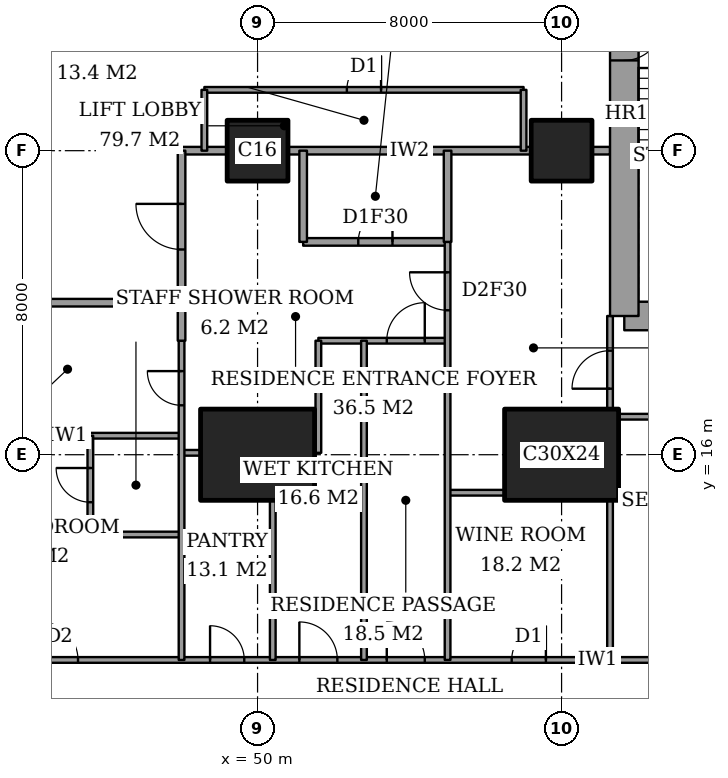
"""IFC4 building model, lengths in metres.
Left out: names, types, materials, properties, quantities, classifications, styles, units other than length and angle.
Written with IfcOpenShell. Run it as: python <this file> out.ifc"""

import sys

from ifc_helpers import new_model, si_unit, direction, frame, frame_2d, origin, origin_2d, place, context, subcontext, project, spatial, rectangle, extrude, element, fill, save


model = new_model("IFC4")
c1 = context("Model", 3, precision=1e-05, world=origin(), true_north=direction((0.0, 1.0)))
c2 = subcontext(c1, "Body", "Model", "MODEL_VIEW")
j1 = project(units=[si_unit("LENGTHUNIT", "METRE"), si_unit("PLANEANGLEUNIT", "RADIAN")], contexts=[c1])
p1 = place(None, origin())
s1 = spatial("IfcSite", under=j1, at=p1, CompositionType="ELEMENT")
p2 = place(p1, origin())
s2 = spatial("IfcBuilding", under=s1, at=p2, CompositionType="ELEMENT")
p3 = place(p2, frame((0.0, 0.0, 241.2)))
s3 = spatial("IfcBuildingStorey", under=s2, at=p3, CompositionType="ELEMENT", Elevation=241.2)
p4 = place(p3, frame((50.0, 16.0, 0.0), z_axis=(0.0, 0.0, 1.0), x_axis=(1.0, 0.0, 0.0)))
e1 = element("IfcColumn", 1, at=p4, inside=s3, PredefinedType="COLUMN", context=c2, shape_type="SweptSolid", body=[
    extrude(rectangle(XDim=3.0, YDim=2.4, at=origin_2d()), origin(), (0.0, 0.0, 1.0), 3.6),
])
p5 = place(p3, frame((50.0, 24.0, 0.0), z_axis=(0.0, 0.0, 1.0), x_axis=(1.0, 0.0, 0.0)))
e2 = element("IfcColumn", 2, at=p5, inside=s3, PredefinedType="COLUMN", context=c2, shape_type="SweptSolid", body=[
    extrude(rectangle(XDim=1.6, YDim=1.6, at=origin_2d()), origin(), (0.0, 0.0, 1.0), 3.6),
])
p6 = place(p3, frame((58.0, 16.0, 0.0), z_axis=(0.0, 0.0, 1.0), x_axis=(1.0, 0.0, 0.0)))
e3 = element("IfcColumn", 3, at=p6, inside=s3, PredefinedType="COLUMN", context=c2, shape_type="SweptSolid", body=[
    extrude(rectangle(XDim=3.0, YDim=2.4, at=origin_2d()), origin(), (0.0, 0.0, 1.0), 3.6),
])
p7 = place(p3, frame((58.0, 24.0, 0.0), z_axis=(0.0, 0.0, 1.0), x_axis=(1.0, 0.0, 0.0)))
e4 = element("IfcColumn", 4, at=p7, inside=s3, PredefinedType="COLUMN", context=c2, shape_type="SweptSolid", body=[
    extrude(rectangle(XDim=1.6, YDim=1.6, at=origin_2d()), origin(), (0.0, 0.0, 1.0), 3.6),
])
p8 = place(p3, frame((59.65, 19.65, 0.0), z_axis=(0.0, 0.0, 1.0), x_axis=(1.0, 0.0, 0.0)))
e5 = element("IfcWall", 5, at=p8, inside=s3, PredefinedType="SHEAR", context=c2, shape_type="SweptSolid", body=[
    extrude(rectangle(XDim=4.45, YDim=0.75, at=frame_2d((2.225, 0.0))), origin(), (0.0, 0.0, 1.0), 3.6),
])
p9 = place(p3, frame((59.65, 28.35, 0.0), z_axis=(0.0, 0.0, 1.0), x_axis=(0.0, -1.0, 0.0)))
e6 = element("IfcWall", 6, at=p9, inside=s3, PredefinedType="SHEAR", context=c2, shape_type="SweptSolid", body=[
    extrude(rectangle(XDim=8.7, YDim=0.75, at=frame_2d((4.35, 0.0))), origin(), (0.0, 0.0, 1.0), 3.6),
])
p10 = place(p9, frame((0.975, 0.0, 0.0)))
e7 = element("IfcOpeningElement", 7, at=p10, cuts=e6, PredefinedType="OPENING", context=c2, shape_type="SweptSolid", body=[
    extrude(rectangle(XDim=1.0, YDim=2.1, at=frame_2d((0.5, 1.05))), frame((0.0, 0.385, 0.0), z_axis=(0.0, -1.0, 0.0), x_axis=(1.0, 0.0, 0.0)), (0.0, 0.0, 1.0), 0.77),
])
p11 = place(p3, frame((41.439, 10.6, 0.0), z_axis=(0.0, 0.0, 1.0), x_axis=(1.0, 0.0, 0.0)))
e8 = element("IfcWall", 8, at=p11, inside=s3, PredefinedType="PARTITIONING", context=c2, shape_type="SweptSolid", body=[
    extrude(rectangle(XDim=25.011, YDim=0.15, at=frame_2d((12.505, 0.0))), origin(), (0.0, 0.0, 1.0), 3.35),
])
p12 = place(p11, frame((11.961, 0.0, 0.0)))
e9 = element("IfcOpeningElement", 9, at=p12, cuts=e8, PredefinedType="OPENING", context=c2, shape_type="SweptSolid", body=[
    extrude(rectangle(XDim=1.0, YDim=2.1, at=frame_2d((0.5, 1.05))), frame((0.0, 0.085, 0.0), z_axis=(0.0, -1.0, 0.0), x_axis=(1.0, 0.0, 0.0)), (0.0, 0.0, 1.0), 0.17),
])
p13 = place(p11, frame((20.924, 0.0, 0.0)))
e10 = element("IfcOpeningElement", 10, at=p13, cuts=e8, PredefinedType="OPENING", context=c2, shape_type="SweptSolid", body=[
    extrude(rectangle(XDim=1.0, YDim=2.1, at=frame_2d((0.5, 1.05))), frame((0.0, 0.085, 0.0), z_axis=(0.0, -1.0, 0.0), x_axis=(1.0, 0.0, 0.0)), (0.0, 0.0, 1.0), 0.17),
])
p14 = place(p11, frame((15.249, 0.0, 0.0)))
e11 = element("IfcOpeningElement", 11, at=p14, cuts=e8, PredefinedType="OPENING", context=c2, shape_type="SweptSolid", body=[
    extrude(rectangle(XDim=0.9, YDim=2.1, at=frame_2d((0.45, 1.05))), frame((0.0, 0.085, 0.0), z_axis=(0.0, -1.0, 0.0), x_axis=(1.0, 0.0, 0.0)), (0.0, 0.0, 1.0), 0.17),
])
p15 = place(p11, frame((9.661, 0.0, 0.0)))
e12 = element("IfcOpeningElement", 12, at=p15, cuts=e8, PredefinedType="OPENING", context=c2, shape_type="SweptSolid", body=[
    extrude(rectangle(XDim=1.0, YDim=2.1, at=frame_2d((0.5, 1.05))), frame((0.0, 0.085, 0.0), z_axis=(0.0, -1.0, 0.0), x_axis=(1.0, 0.0, 0.0)), (0.0, 0.0, 1.0), 0.17),
])
p16 = place(p11, frame((7.311, 0.0, 0.0)))
e13 = element("IfcOpeningElement", 13, at=p16, cuts=e8, PredefinedType="OPENING", context=c2, shape_type="SweptSolid", body=[
    extrude(rectangle(XDim=0.9, YDim=2.1, at=frame_2d((0.45, 1.05))), frame((0.0, 0.085, 0.0), z_axis=(0.0, -1.0, 0.0), x_axis=(1.0, 0.0, 0.0)), (0.0, 0.0, 1.0), 0.17),
])
p17 = place(p11, frame((2.836, 0.0, 0.0)))
e14 = element("IfcOpeningElement", 14, at=p17, cuts=e8, PredefinedType="OPENING", context=c2, shape_type="SweptSolid", body=[
    extrude(rectangle(XDim=1.0, YDim=2.1, at=frame_2d((0.5, 1.05))), frame((0.0, 0.085, 0.0), z_axis=(0.0, -1.0, 0.0), x_axis=(1.0, 0.0, 0.0)), (0.0, 0.0, 1.0), 0.17),
])
p18 = place(p3, frame((45.6, 13.9, 0.0), z_axis=(0.0, 0.0, 1.0), x_axis=(1.0, 0.0, 0.0)))
e15 = element("IfcWall", 15, at=p18, inside=s3, PredefinedType="PARTITIONING", context=c2, shape_type="SweptSolid", body=[
    extrude(rectangle(XDim=2.4, YDim=0.15, at=frame_2d((1.2, 0.0))), origin(), (0.0, 0.0, 1.0), 3.35),
])
p19 = place(p3, frame((55.0, 15.0, 0.0), z_axis=(0.0, 0.0, 1.0), x_axis=(1.0, 0.0, 0.0)))
e16 = element("IfcWall", 16, at=p19, inside=s3, PredefinedType="PARTITIONING", context=c2, shape_type="SweptSolid", body=[
    extrude(rectangle(XDim=1.5, YDim=0.15, at=frame_2d((0.75, 0.0))), origin(), (0.0, 0.0, 1.0), 3.35),
])
p20 = place(p3, frame((48.0, 16.05, 0.0), z_axis=(0.0, 0.0, 1.0), x_axis=(1.0, 0.0, 0.0)))
e17 = element("IfcWall", 17, at=p20, inside=s3, PredefinedType="PARTITIONING", context=c2, shape_type="SweptSolid", body=[
    extrude(rectangle(XDim=0.5, YDim=0.15, at=frame_2d((0.25, 0.0))), origin(), (0.0, 0.0, 1.0), 2.634),
])
p21 = place(p3, frame((42.0, 16.5, 0.0), z_axis=(0.0, 0.0, 1.0), x_axis=(1.0, 0.0, 0.0)))
e18 = element("IfcWall", 18, at=p21, inside=s3, PredefinedType="PARTITIONING", context=c2, shape_type="SweptSolid", body=[
    extrude(rectangle(XDim=6.0, YDim=0.15, at=frame_2d((3.0, 0.0))), origin(), (0.0, 0.0, 1.0), 3.35),
])
p22 = place(p3, frame((59.5, 17.0, 0.0), z_axis=(0.0, 0.0, 1.0), x_axis=(1.0, 0.0, 0.0)))
e19 = element("IfcWall", 19, at=p22, inside=s3, PredefinedType="PARTITIONING", context=c2, shape_type="SweptSolid", body=[
    extrude(rectangle(XDim=6.95, YDim=0.15, at=frame_2d((3.475, 0.0))), origin(), (0.0, 0.0, 1.0), 3.35),
])
p23 = place(p3, frame((51.6, 19.0, 0.0), z_axis=(0.0, 0.0, 1.0), x_axis=(1.0, 0.0, 0.0)))
e20 = element("IfcWall", 20, at=p23, inside=s3, PredefinedType="PARTITIONING", context=c2, shape_type="SweptSolid", body=[
    extrude(rectangle(XDim=3.4, YDim=0.15, at=frame_2d((1.7, 0.0))), origin(), (0.0, 0.0, 1.0), 3.35),
])
p24 = place(p23, frame((1.8, 0.0, 0.0)))
e21 = element("IfcOpeningElement", 21, at=p24, cuts=e20, PredefinedType="OPENING", context=c2, shape_type="SweptSolid", body=[
    extrude(rectangle(XDim=1.0, YDim=2.1, at=frame_2d((0.5, 1.05))), frame((0.0, 0.085, 0.0), z_axis=(0.0, -1.0, 0.0), x_axis=(1.0, 0.0, 0.0)), (0.0, 0.0, 1.0), 0.17),
])
p25 = place(p3, frame((42.0, 20.0, 0.0), z_axis=(0.0, 0.0, 1.0), x_axis=(1.0, 0.0, 0.0)))
e22 = element("IfcWall", 22, at=p25, inside=s3, PredefinedType="PARTITIONING", context=c2, shape_type="SweptSolid", body=[
    extrude(rectangle(XDim=6.0, YDim=0.2, at=frame_2d((3.0, 0.0))), origin(), (0.0, 0.0, 1.0), 3.35),
])
p26 = place(p3, frame((51.2, 21.6, 0.0), z_axis=(0.0, 0.0, 1.0), x_axis=(1.0, 0.0, 0.0)))
e23 = element("IfcWall", 23, at=p26, inside=s3, PredefinedType="PARTITIONING", context=c2, shape_type="SweptSolid", body=[
    extrude(rectangle(XDim=3.8, YDim=0.2, at=frame_2d((1.9, 0.0))), origin(), (0.0, 0.0, 1.0), 3.35),
])
p27 = place(p26, frame((1.45, 0.0, 0.0)))
e24 = element("IfcOpeningElement", 24, at=p27, cuts=e23, PredefinedType="OPENING", context=c2, shape_type="SweptSolid", body=[
    extrude(rectangle(XDim=0.9, YDim=2.1, at=frame_2d((0.45, 1.05))), frame((0.0, 0.11, 0.0), z_axis=(0.0, -1.0, 0.0), x_axis=(1.0, 0.0, 0.0)), (0.0, 0.0, 1.0), 0.22),
])
p28 = place(p3, frame((48.0, 24.0, 0.0), z_axis=(0.0, 0.0, 1.0), x_axis=(1.0, 0.0, 0.0)))
e25 = element("IfcWall", 25, at=p28, inside=s3, PredefinedType="PARTITIONING", context=c2, shape_type="SweptSolid", body=[
    extrude(rectangle(XDim=1.2, YDim=0.2, at=frame_2d((0.6, 0.0))), origin(), (0.0, 0.0, 1.0), 3.35),
])
p29 = place(p3, frame((50.8, 24.0, 0.0), z_axis=(0.0, 0.0, 1.0), x_axis=(1.0, 0.0, 0.0)))
e26 = element("IfcWall", 26, at=p29, inside=s3, PredefinedType="PARTITIONING", context=c2, shape_type="SweptSolid", body=[
    extrude(rectangle(XDim=6.4, YDim=0.2, at=frame_2d((3.2, 0.0))), origin(), (0.0, 0.0, 1.0), 3.35),
])
p30 = place(p3, frame((58.8, 24.0, 0.0), z_axis=(0.0, 0.0, 1.0), x_axis=(1.0, 0.0, 0.0)))
e27 = element("IfcWall", 27, at=p30, inside=s3, PredefinedType="PARTITIONING", context=c2, shape_type="SweptSolid", body=[
    extrude(rectangle(XDim=0.475, YDim=0.2, at=frame_2d((0.237, 0.0))), origin(), (0.0, 0.0, 1.0), 3.35),
])
p31 = place(p3, frame((48.6, 25.6, 0.0), z_axis=(0.0, 0.0, 1.0), x_axis=(1.0, 0.0, 0.0)))
e28 = element("IfcWall", 28, at=p31, inside=s3, PredefinedType="PARTITIONING", context=c2, shape_type="SweptSolid", body=[
    extrude(rectangle(XDim=8.4, YDim=0.15, at=frame_2d((4.2, 0.0))), origin(), (0.0, 0.0, 1.0), 3.35),
])
p32 = place(p31, frame((3.75, 0.0, 0.0)))
e29 = element("IfcOpeningElement", 29, at=p32, cuts=e28, PredefinedType="OPENING", context=c2, shape_type="SweptSolid", body=[
    extrude(rectangle(XDim=0.9, YDim=2.1, at=frame_2d((0.45, 1.05))), frame((0.0, 0.085, 0.0), z_axis=(0.0, -1.0, 0.0), x_axis=(1.0, 0.0, 0.0)), (0.0, 0.0, 1.0), 0.17),
])
p33 = place(p3, frame((45.6, 13.9, 0.0), z_axis=(0.0, 0.0, 1.0), x_axis=(0.0, 1.0, 0.0)))
e30 = element("IfcWall", 30, at=p33, inside=s3, PredefinedType="PARTITIONING", context=c2, shape_type="SweptSolid", body=[
    extrude(rectangle(XDim=2.6, YDim=0.15, at=frame_2d((1.3, 0.0))), origin(), (0.0, 0.0, 1.0), 3.35),
])
p34 = place(p33, frame((0.85, 0.0, 0.0)))
e31 = element("IfcOpeningElement", 31, at=p34, cuts=e30, PredefinedType="OPENING", context=c2, shape_type="SweptSolid", body=[
    extrude(rectangle(XDim=0.9, YDim=2.1, at=frame_2d((0.45, 1.05))), frame((0.0, 0.085, 0.0), z_axis=(0.0, -1.0, 0.0), x_axis=(1.0, 0.0, 0.0)), (0.0, 0.0, 1.0), 0.17),
])
p35 = place(p3, frame((48.0, 19.0, 0.0), z_axis=(0.0, 0.0, 1.0), x_axis=(0.0, 1.0, 0.0)))
e32 = element("IfcWall", 32, at=p35, inside=s3, PredefinedType="PARTITIONING", context=c2, shape_type="SweptSolid", body=[
    extrude(rectangle(XDim=5.0, YDim=0.2, at=frame_2d((2.5, 0.0))), origin(), (0.0, 0.0, 1.0), 3.35),
])
p36 = place(p35, frame((2.4, 0.0, 0.0)))
e33 = element("IfcOpeningElement", 33, at=p36, cuts=e32, PredefinedType="OPENING", context=c2, shape_type="SweptSolid", body=[
    extrude(rectangle(XDim=1.2, YDim=2.4, at=frame_2d((0.6, 1.2))), frame((0.0, 0.11, 0.0), z_axis=(0.0, -1.0, 0.0), x_axis=(1.0, 0.0, 0.0)), (0.0, 0.0, 1.0), 0.22),
])
p37 = place(p3, frame((48.0, 10.6, 0.0), z_axis=(0.0, 0.0, 1.0), x_axis=(0.0, 1.0, 0.0)))
e34 = element("IfcWall", 34, at=p37, inside=s3, PredefinedType="PARTITIONING", context=c2, shape_type="SweptSolid", body=[
    extrude(rectangle(XDim=8.4, YDim=0.15, at=frame_2d((4.2, 0.0))), origin(), (0.0, 0.0, 1.0), 3.35),
])
p38 = place(p37, frame((6.7, 0.0, 0.0)))
e35 = element("IfcOpeningElement", 35, at=p38, cuts=e34, PredefinedType="OPENING", context=c2, shape_type="SweptSolid", body=[
    extrude(rectangle(XDim=0.9, YDim=2.1, at=frame_2d((0.45, 1.05))), frame((0.0, 0.085, 0.0), z_axis=(0.0, -1.0, 0.0), x_axis=(1.0, 0.0, 0.0)), (0.0, 0.0, 1.0), 0.17),
])
p39 = place(p3, frame((48.6, 24.0, 0.0), z_axis=(0.0, 0.0, 1.0), x_axis=(0.0, 1.0, 0.0)))
e36 = element("IfcWall", 36, at=p39, inside=s3, PredefinedType="PARTITIONING", context=c2, shape_type="SweptSolid", body=[
    extrude(rectangle(XDim=1.6, YDim=0.15, at=frame_2d((0.8, 0.0))), origin(), (0.0, 0.0, 1.0), 3.35),
])
p40 = place(p3, frame((50.4, 10.6, 0.0), z_axis=(0.0, 0.0, 1.0), x_axis=(0.0, 1.0, 0.0)))
e37 = element("IfcWall", 37, at=p40, inside=s3, PredefinedType="PARTITIONING", context=c2, shape_type="SweptSolid", body=[
    extrude(rectangle(XDim=4.2, YDim=0.15, at=frame_2d((2.1, 0.0))), origin(), (0.0, 0.0, 1.0), 3.35),
])
p41 = place(p3, frame((51.2, 21.6, 0.0), z_axis=(0.0, 0.0, 1.0), x_axis=(0.0, 1.0, 0.0)))
e38 = element("IfcWall", 38, at=p41, inside=s3, PredefinedType="PARTITIONING", context=c2, shape_type="SweptSolid", body=[
    extrude(rectangle(XDim=2.4, YDim=0.2, at=frame_2d((1.2, 0.0))), origin(), (0.0, 0.0, 1.0), 3.35),
])
p42 = place(p3, frame((51.6, 16.05, 0.0), z_axis=(0.0, 0.0, 1.0), x_axis=(0.0, 1.0, 0.0)))
e39 = element("IfcWall", 39, at=p42, inside=s3, PredefinedType="PARTITIONING", context=c2, shape_type="SweptSolid", body=[
    extrude(rectangle(XDim=2.95, YDim=0.15, at=frame_2d((1.475, 0.0))), origin(), (0.0, 0.0, 1.0), 3.35),
])
p43 = place(p3, frame((52.8, 10.6, 0.0), z_axis=(0.0, 0.0, 1.0), x_axis=(0.0, 1.0, 0.0)))
e40 = element("IfcWall", 40, at=p43, inside=s3, PredefinedType="PARTITIONING", context=c2, shape_type="SweptSolid", body=[
    extrude(rectangle(XDim=8.4, YDim=0.15, at=frame_2d((4.2, 0.0))), origin(), (0.0, 0.0, 1.0), 3.35),
])
p44 = place(p3, frame((55.0, 21.6, 0.0), z_axis=(0.0, 0.0, 1.0), x_axis=(0.0, 1.0, 0.0)))
e41 = element("IfcWall", 41, at=p44, inside=s3, PredefinedType="PARTITIONING", context=c2, shape_type="SweptSolid", body=[
    extrude(rectangle(XDim=2.4, YDim=0.2, at=frame_2d((1.2, 0.0))), origin(), (0.0, 0.0, 1.0), 3.35),
])
p45 = place(p3, frame((55.0, 10.6, 0.0), z_axis=(0.0, 0.0, 1.0), x_axis=(0.0, 1.0, 0.0)))
e42 = element("IfcWall", 42, at=p45, inside=s3, PredefinedType="PARTITIONING", context=c2, shape_type="SweptSolid", body=[
    extrude(rectangle(XDim=11.0, YDim=0.15, at=frame_2d((5.5, 0.0))), origin(), (0.0, 0.0, 1.0), 3.35),
])
p46 = place(p45, frame((9.2, 0.0, 0.0)))
e43 = element("IfcOpeningElement", 43, at=p46, cuts=e42, PredefinedType="OPENING", context=c2, shape_type="SweptSolid", body=[
    extrude(rectangle(XDim=1.0, YDim=2.1, at=frame_2d((0.5, 1.05))), frame((0.0, 0.085, 0.0), z_axis=(0.0, -1.0, 0.0), x_axis=(1.0, 0.0, 0.0)), (0.0, 0.0, 1.0), 0.17),
])
p47 = place(p3, frame((57.0, 24.0, 0.0), z_axis=(0.0, 0.0, 1.0), x_axis=(0.0, 1.0, 0.0)))
e44 = element("IfcWall", 44, at=p47, inside=s3, PredefinedType="PARTITIONING", context=c2, shape_type="SweptSolid", body=[
    extrude(rectangle(XDim=1.6, YDim=0.15, at=frame_2d((0.8, 0.0))), origin(), (0.0, 0.0, 1.0), 3.35),
])
p48 = place(p3, frame((59.275, 10.6, 0.0), z_axis=(0.0, 0.0, 1.0), x_axis=(0.0, 1.0, 0.0)))
e45 = element("IfcWall", 45, at=p48, inside=s3, PredefinedType="PARTITIONING", context=c2, shape_type="SweptSolid", body=[
    extrude(rectangle(XDim=4.2, YDim=0.15, at=frame_2d((2.1, 0.0))), origin(), (0.0, 0.0, 1.0), 3.35),
])
p49 = place(p3, frame((59.275, 17.2, 0.0), z_axis=(0.0, 0.0, 1.0), x_axis=(0.0, 1.0, 0.0)))
e46 = element("IfcWall", 46, at=p49, inside=s3, PredefinedType="PARTITIONING", context=c2, shape_type="SweptSolid", body=[
    extrude(rectangle(XDim=2.45, YDim=0.15, at=frame_2d((1.225, 0.0))), origin(), (0.0, 0.0, 1.0), 3.35),
])
p50 = place(p49, frame((0.538, 0.0, 0.0)))
e47 = element("IfcOpeningElement", 47, at=p50, cuts=e46, PredefinedType="OPENING", context=c2, shape_type="SweptSolid", body=[
    extrude(rectangle(XDim=1.0, YDim=2.1, at=frame_2d((0.5, 1.05))), frame((0.0, 0.085, 0.0), z_axis=(0.0, -1.0, 0.0), x_axis=(1.0, 0.0, 0.0)), (0.0, 0.0, 1.0), 0.17),
])
p51 = place(p12, origin())
e48 = element("IfcDoor", 48, at=p51, inside=s3, OperationType="SINGLE_SWING_RIGHT", PredefinedType="DOOR", context=c2, shape_type="SweptSolid", body=[
    extrude(rectangle(XDim=1.0, YDim=2.1, at=frame_2d((0.5, 1.05))), frame((0.0, 0.025, 0.0), z_axis=(0.0, -1.0, 0.0), x_axis=(1.0, 0.0, 0.0)), (0.0, 0.0, 1.0), 0.05),
])
fill(e9, e48)
p52 = place(p50, origin())
e49 = element("IfcDoor", 49, at=p52, inside=s3, OperationType="SINGLE_SWING_RIGHT", PredefinedType="DOOR", context=c2, shape_type="SweptSolid", body=[
    extrude(rectangle(XDim=1.0, YDim=2.1, at=frame_2d((0.5, 1.05))), frame((0.0, 0.025, 0.0), z_axis=(0.0, -1.0, 0.0), x_axis=(1.0, 0.0, 0.0)), (0.0, 0.0, 1.0), 0.05),
])
fill(e47, e49)
p53 = place(p14, origin())
e50 = element("IfcDoor", 50, at=p53, inside=s3, OperationType="SINGLE_SWING_LEFT", PredefinedType="DOOR", context=c2, shape_type="SweptSolid", body=[
    extrude(rectangle(XDim=0.9, YDim=2.1, at=frame_2d((0.45, 1.05))), frame((0.0, 0.025, 0.0), z_axis=(0.0, -1.0, 0.0), x_axis=(1.0, 0.0, 0.0)), (0.0, 0.0, 1.0), 0.05),
])
fill(e11, e50)
p54 = place(p46, origin())
e51 = element("IfcDoor", 51, at=p54, inside=s3, OperationType="SINGLE_SWING_LEFT", PredefinedType="DOOR", context=c2, shape_type="SweptSolid", body=[
    extrude(rectangle(XDim=1.0, YDim=2.1, at=frame_2d((0.5, 1.05))), frame((0.0, 0.025, 0.0), z_axis=(0.0, -1.0, 0.0), x_axis=(1.0, 0.0, 0.0)), (0.0, 0.0, 1.0), 0.05),
])
fill(e43, e51)
p55 = place(p27, origin())
e52 = element("IfcDoor", 52, at=p55, inside=s3, OperationType="SINGLE_SWING_LEFT", PredefinedType="DOOR", context=c2, shape_type="SweptSolid", body=[
    extrude(rectangle(XDim=0.9, YDim=2.1, at=frame_2d((0.45, 1.05))), frame((0.0, 0.025, 0.0), z_axis=(0.0, -1.0, 0.0), x_axis=(1.0, 0.0, 0.0)), (0.0, 0.0, 1.0), 0.05),
])
fill(e24, e52)
p56 = place(p36, origin())
e53 = element("IfcDoor", 53, at=p56, inside=s3, OperationType="SINGLE_SWING_LEFT", PredefinedType="DOOR", context=c2, shape_type="SweptSolid", body=[
    extrude(rectangle(XDim=1.2, YDim=2.4, at=frame_2d((0.6, 1.2))), frame((0.0, 0.025, 0.0), z_axis=(0.0, -1.0, 0.0), x_axis=(1.0, 0.0, 0.0)), (0.0, 0.0, 1.0), 0.05),
])
fill(e33, e53)
p57 = place(p24, origin())
e54 = element("IfcDoor", 54, at=p57, inside=s3, OperationType="SINGLE_SWING_LEFT", PredefinedType="DOOR", context=c2, shape_type="SweptSolid", body=[
    extrude(rectangle(XDim=1.0, YDim=2.1, at=frame_2d((0.5, 1.05))), frame((0.0, 0.025, 0.0), z_axis=(0.0, -1.0, 0.0), x_axis=(1.0, 0.0, 0.0)), (0.0, 0.0, 1.0), 0.05),
])
fill(e21, e54)
p58 = place(p15, origin())
e55 = element("IfcDoor", 55, at=p58, inside=s3, OperationType="SINGLE_SWING_RIGHT", PredefinedType="DOOR", context=c2, shape_type="SweptSolid", body=[
    extrude(rectangle(XDim=1.0, YDim=2.1, at=frame_2d((0.5, 1.05))), frame((0.0, 0.025, 0.0), z_axis=(0.0, -1.0, 0.0), x_axis=(1.0, 0.0, 0.0)), (0.0, 0.0, 1.0), 0.05),
])
fill(e12, e55)
p59 = place(p16, origin())
e56 = element("IfcDoor", 56, at=p59, inside=s3, OperationType="SINGLE_SWING_RIGHT", PredefinedType="DOOR", context=c2, shape_type="SweptSolid", body=[
    extrude(rectangle(XDim=0.9, YDim=2.1, at=frame_2d((0.45, 1.05))), frame((0.0, 0.025, 0.0), z_axis=(0.0, -1.0, 0.0), x_axis=(1.0, 0.0, 0.0)), (0.0, 0.0, 1.0), 0.05),
])
fill(e13, e56)
p60 = place(p34, origin())
e57 = element("IfcDoor", 57, at=p60, inside=s3, OperationType="SINGLE_SWING_LEFT", PredefinedType="DOOR", context=c2, shape_type="SweptSolid", body=[
    extrude(rectangle(XDim=0.9, YDim=2.1, at=frame_2d((0.45, 1.05))), frame((0.0, 0.025, 0.0), z_axis=(0.0, -1.0, 0.0), x_axis=(1.0, 0.0, 0.0)), (0.0, 0.0, 1.0), 0.05),
])
fill(e31, e57)
p61 = place(p17, origin())
e58 = element("IfcDoor", 58, at=p61, inside=s3, OperationType="SINGLE_SWING_RIGHT", PredefinedType="DOOR", context=c2, shape_type="SweptSolid", body=[
    extrude(rectangle(XDim=1.0, YDim=2.1, at=frame_2d((0.5, 1.05))), frame((0.0, 0.025, 0.0), z_axis=(0.0, -1.0, 0.0), x_axis=(1.0, 0.0, 0.0)), (0.0, 0.0, 1.0), 0.05),
])
fill(e14, e58)
p62 = place(p38, origin())
e59 = element("IfcDoor", 59, at=p62, inside=s3, OperationType="SINGLE_SWING_LEFT", PredefinedType="DOOR", context=c2, shape_type="SweptSolid", body=[
    extrude(rectangle(XDim=0.9, YDim=2.1, at=frame_2d((0.45, 1.05))), frame((0.0, 0.025, 0.0), z_axis=(0.0, -1.0, 0.0), x_axis=(1.0, 0.0, 0.0)), (0.0, 0.0, 1.0), 0.05),
])
fill(e35, e59)
p63 = place(p32, origin())
e60 = element("IfcDoor", 60, at=p63, inside=s3, OperationType="SINGLE_SWING_LEFT", PredefinedType="DOOR", context=c2, shape_type="SweptSolid", body=[
    extrude(rectangle(XDim=0.9, YDim=2.1, at=frame_2d((0.45, 1.05))), frame((0.0, 0.025, 0.0), z_axis=(0.0, -1.0, 0.0), x_axis=(1.0, 0.0, 0.0)), (0.0, 0.0, 1.0), 0.05),
])
fill(e29, e60)
p64 = place(p10, origin())
e61 = element("IfcDoor", 61, at=p64, inside=s3, OperationType="SINGLE_SWING_RIGHT", PredefinedType="DOOR", context=c2, shape_type="SweptSolid", body=[
    extrude(rectangle(XDim=1.0, YDim=2.1, at=frame_2d((0.5, 1.05))), frame((0.0, 0.025, 0.0), z_axis=(0.0, -1.0, 0.0), x_axis=(1.0, 0.0, 0.0)), (0.0, 0.0, 1.0), 0.05),
])
fill(e7, e61)
save(model, sys.argv[1])
